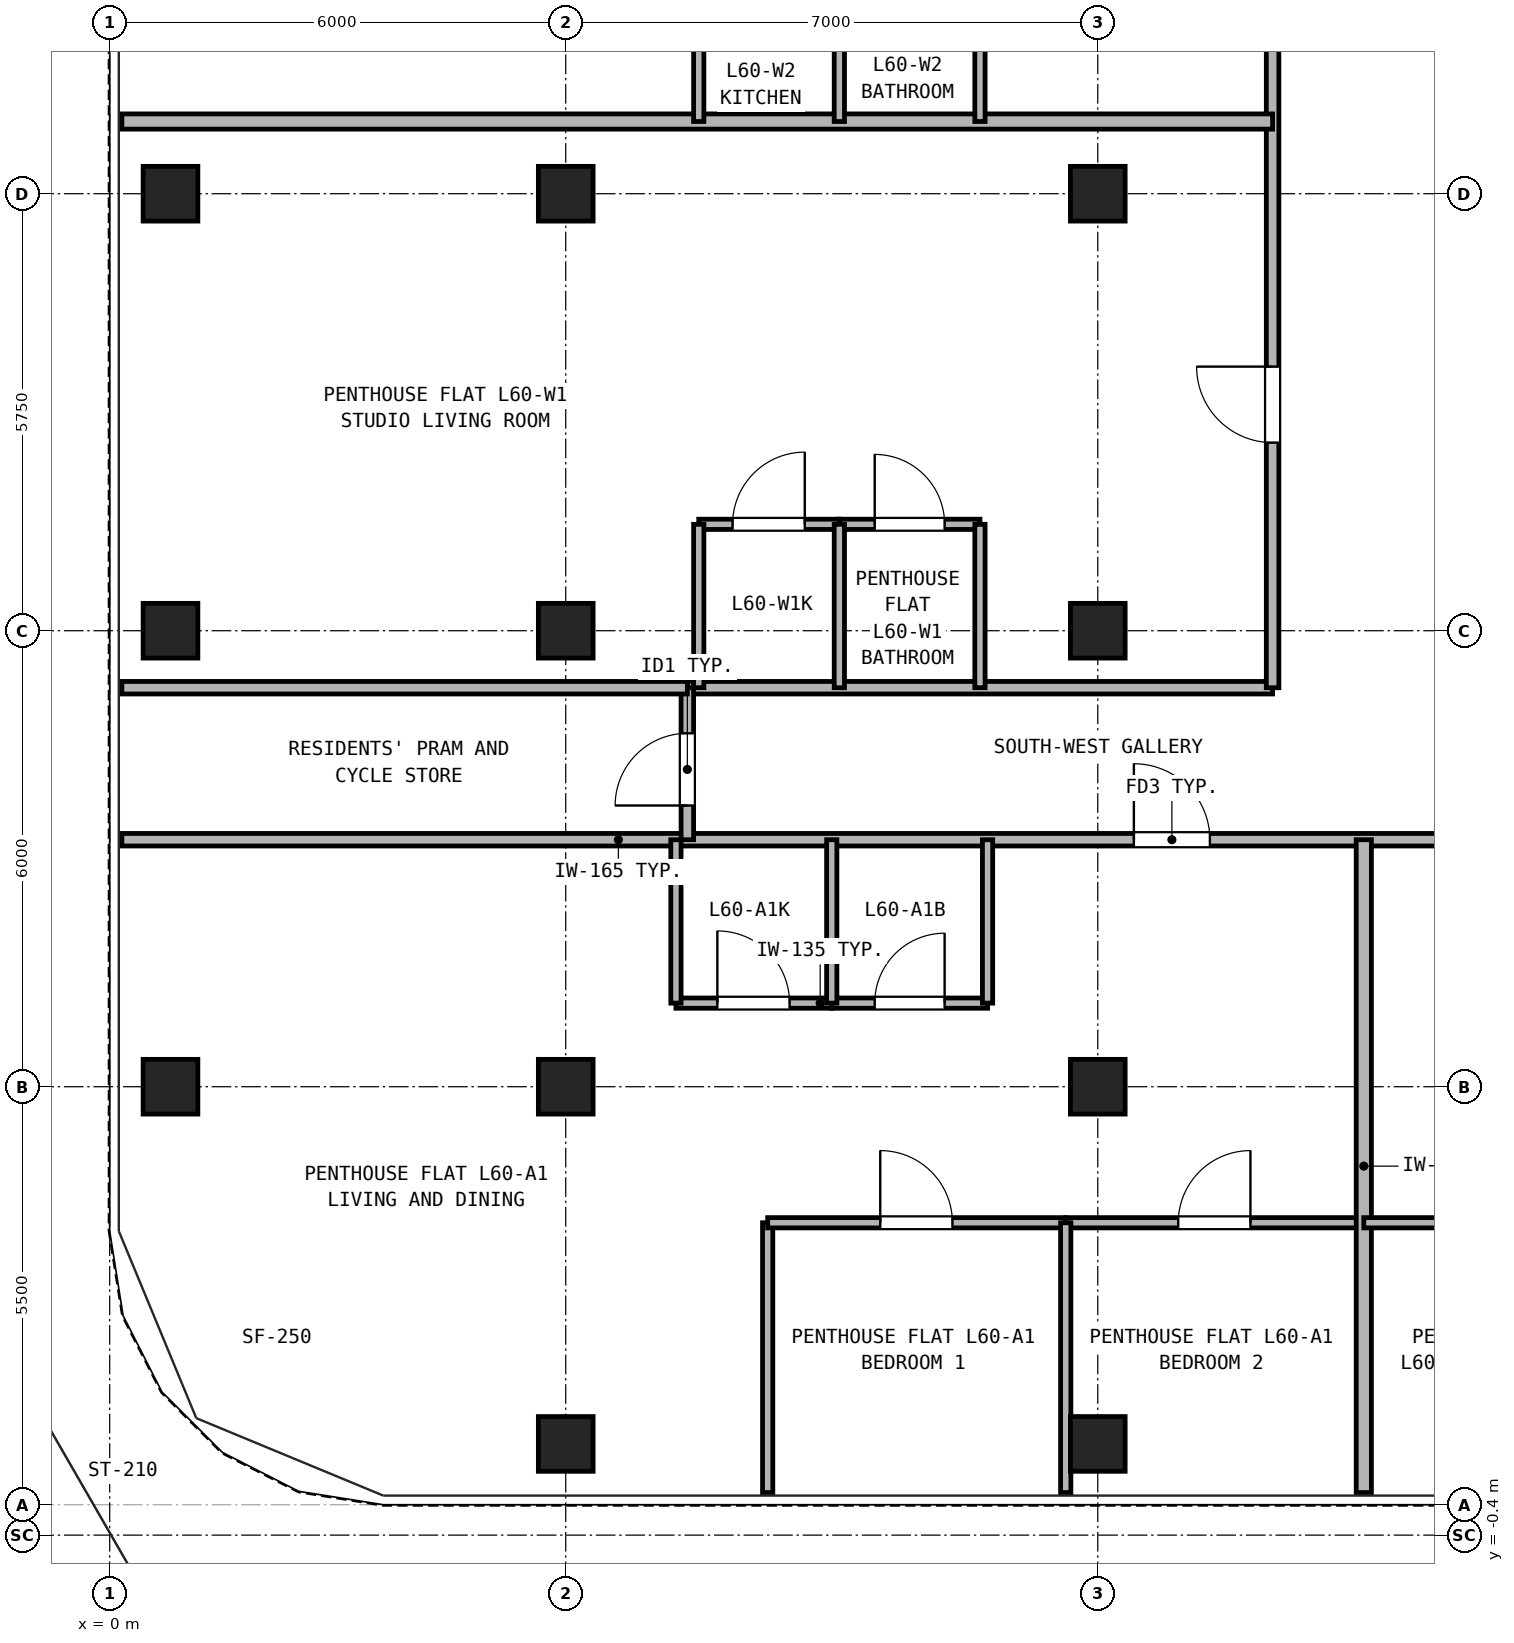
"""IFC4 building model, lengths in metres.
Left out: names, types, materials, properties, quantities, classifications, styles, units other than length and angle.
Written with IfcOpenShell. Run it as: python <this file> out.ifc"""

import sys

from ifc_helpers import new_model, si_unit, direction, frame, frame_2d, origin, origin_2d, place, context, subcontext, project, spatial, rectangle, hollow_rectangle, extrude, source, transform, mapped, element, fill, save


model = new_model("IFC4")
c1 = context("Model", 3, precision=1e-05, world=origin(), true_north=direction((0.0, 1.0)))
c2 = subcontext(c1, "Body", "Model", "MODEL_VIEW")
j1 = project(units=[si_unit("LENGTHUNIT", "METRE"), si_unit("PLANEANGLEUNIT", "RADIAN")], contexts=[c1])
p1 = place(None, origin())
s1 = spatial("IfcSite", under=j1, at=p1, CompositionType="ELEMENT")
p2 = place(p1, origin())
s2 = spatial("IfcBuilding", under=s1, at=p2, CompositionType="ELEMENT")
p3 = place(p2, frame((0.0, 0.0, 212.4)))
s3 = spatial("IfcBuildingStorey", under=s2, at=p3, CompositionType="ELEMENT", Elevation=212.4)
m1 = source(origin(), c2, "Body", "SweptSolid", [
    extrude(hollow_rectangle(XDim=0.72, YDim=0.72, WallThickness=0.04, at=origin_2d()), origin(), (0.0, 0.0, 1.0), 2.84),
])
for number, where, z_axis, x_axis in (
    (1, (6.0, 0.8, 0.0), (0.0, 0.0, 1.0), (1.0, 0.0, 0.0)),
    (2, (13.0, 0.8, 0.0), (0.0, 0.0, 1.0), (1.0, 0.0, 0.0)),
    (3, (0.8, 5.5, 0.0), (0.0, 0.0, 1.0), (1.0, 0.0, 0.0)),
    (4, (0.8, 11.5, 0.0), (0.0, 0.0, 1.0), (1.0, 0.0, 0.0)),
    (5, (0.8, 17.25, 0.0), (0.0, 0.0, 1.0), (1.0, 0.0, 0.0)),
    (6, (6.0, 5.5, 0.0), (0.0, 0.0, 1.0), (1.0, 0.0, 0.0)),
    (7, (6.0, 11.5, 0.0), (0.0, 0.0, 1.0), (1.0, 0.0, 0.0)),
    (8, (6.0, 17.25, 0.0), (0.0, 0.0, 1.0), (1.0, 0.0, 0.0)),
    (9, (13.0, 5.5, 0.0), (0.0, 0.0, 1.0), (1.0, 0.0, 0.0)),
    (10, (13.0, 11.5, 0.0), (0.0, 0.0, 1.0), (1.0, 0.0, 0.0)),
    (11, (13.0, 17.25, 0.0), (0.0, 0.0, 1.0), (1.0, 0.0, 0.0)),
):
    element("IfcColumn", number, at=place(p3, frame(where, z_axis=z_axis, x_axis=x_axis)), inside=s3, PredefinedType="COLUMN", context=c2, shape_type="MappedRepresentation", body=[
        mapped(m1, transform((0.0, 0.0, 0.0), x_axis=(1.0, 0.0, 0.0), y_axis=(0.0, 1.0, 0.0), z_axis=(0.0, 0.0, 1.0), scale=1.0)),
    ])
p4 = place(p3, frame((0.16, 8.75, 0.0), z_axis=(0.0, 0.0, 1.0), x_axis=(1.0, 0.0, 0.0)))
e12 = element("IfcWall", 12, at=p4, inside=s3, PredefinedType="PARTITIONING", context=c2, shape_type="SweptSolid", body=[
    extrude(rectangle(XDim=41.48, YDim=0.165, at=frame_2d((20.74, 0.0))), origin(), (0.0, 0.0, 1.0), 2.84),
])
p5 = place(p4, frame((13.315, 0.0, 0.0)))
e13 = element("IfcOpeningElement", 13, at=p5, cuts=e12, PredefinedType="OPENING", context=c2, shape_type="SweptSolid", body=[
    extrude(rectangle(XDim=1.0, YDim=2.15, at=frame_2d((0.5, 1.075))), frame((0.0, 0.093, 0.0), z_axis=(0.0, -1.0, 0.0), x_axis=(1.0, 0.0, 0.0)), (0.0, 0.0, 1.0), 0.185),
])
p6 = place(p4, frame((19.115, 0.0, 0.0)))
e14 = element("IfcOpeningElement", 14, at=p6, cuts=e12, PredefinedType="OPENING", context=c2, shape_type="SweptSolid", body=[
    extrude(rectangle(XDim=1.0, YDim=2.15, at=frame_2d((0.5, 1.075))), frame((0.0, 0.093, 0.0), z_axis=(0.0, -1.0, 0.0), x_axis=(1.0, 0.0, 0.0)), (0.0, 0.0, 1.0), 0.185),
])
p7 = place(p4, frame((31.865, 0.0, 0.0)))
e15 = element("IfcOpeningElement", 15, at=p7, cuts=e12, PredefinedType="OPENING", context=c2, shape_type="SweptSolid", body=[
    extrude(rectangle(XDim=1.0, YDim=2.15, at=frame_2d((0.5, 1.075))), frame((0.0, 0.093, 0.0), z_axis=(0.0, -1.0, 0.0), x_axis=(1.0, 0.0, 0.0)), (0.0, 0.0, 1.0), 0.185),
])
p8 = place(p3, frame((7.6, 10.75, 0.0), z_axis=(0.0, 0.0, 1.0), x_axis=(1.0, 0.0, 0.0)))
e16 = element("IfcWall", 16, at=p8, inside=s3, PredefinedType="PARTITIONING", context=c2, shape_type="SweptSolid", body=[
    extrude(rectangle(XDim=7.7, YDim=0.165, at=frame_2d((3.85, 0.0))), origin(), (0.0, 0.0, 1.0), 2.84),
])
p9 = place(p3, frame((7.6, 8.75, 0.0), z_axis=(0.0, 0.0, 1.0), x_axis=(0.0, 1.0, 0.0)))
e17 = element("IfcWall", 17, at=p9, inside=s3, PredefinedType="PARTITIONING", context=c2, shape_type="SweptSolid", body=[
    extrude(rectangle(XDim=2.0, YDim=0.165, at=frame_2d((1.0, 0.0))), origin(), (0.0, 0.0, 1.0), 2.84),
])
p10 = place(p9, frame((0.45, 0.0, 0.0)))
e18 = element("IfcOpeningElement", 18, at=p10, cuts=e17, PredefinedType="OPENING", context=c2, shape_type="SweptSolid", body=[
    extrude(rectangle(XDim=0.95, YDim=2.15, at=frame_2d((0.475, 1.075))), frame((0.0, 0.093, 0.0), z_axis=(0.0, -1.0, 0.0), x_axis=(1.0, 0.0, 0.0)), (0.0, 0.0, 1.0), 0.185),
])
p11 = place(p3, frame((15.3, 10.75, 0.0), z_axis=(0.0, 0.0, 1.0), x_axis=(0.0, 1.0, 0.0)))
e19 = element("IfcWall", 19, at=p11, inside=s3, PredefinedType="PARTITIONING", context=c2, shape_type="SweptSolid", body=[
    extrude(rectangle(XDim=24.39, YDim=0.165, at=frame_2d((12.195, 0.0))), origin(), (0.0, 0.0, 1.0), 2.84),
])
p12 = place(p11, frame((3.225, 0.0, 0.0)))
e20 = element("IfcOpeningElement", 20, at=p12, cuts=e19, PredefinedType="OPENING", context=c2, shape_type="SweptSolid", body=[
    extrude(rectangle(XDim=1.0, YDim=2.15, at=frame_2d((0.5, 1.075))), frame((0.0, 0.093, 0.0), z_axis=(0.0, -1.0, 0.0), x_axis=(1.0, 0.0, 0.0)), (0.0, 0.0, 1.0), 0.185),
])
p13 = place(p11, frame((11.15, 0.0, 0.0)))
e21 = element("IfcOpeningElement", 21, at=p13, cuts=e19, PredefinedType="OPENING", context=c2, shape_type="SweptSolid", body=[
    extrude(rectangle(XDim=1.0, YDim=2.15, at=frame_2d((0.5, 1.075))), frame((0.0, 0.093, 0.0), z_axis=(0.0, -1.0, 0.0), x_axis=(1.0, 0.0, 0.0)), (0.0, 0.0, 1.0), 0.185),
])
p14 = place(p11, frame((17.8, 0.0, 0.0)))
e22 = element("IfcOpeningElement", 22, at=p14, cuts=e19, PredefinedType="OPENING", context=c2, shape_type="SweptSolid", body=[
    extrude(rectangle(XDim=1.0, YDim=2.15, at=frame_2d((0.5, 1.075))), frame((0.0, 0.093, 0.0), z_axis=(0.0, -1.0, 0.0), x_axis=(1.0, 0.0, 0.0)), (0.0, 0.0, 1.0), 0.185),
])
p15 = place(p3, frame((7.45, 6.6, 0.0), z_axis=(0.0, 0.0, 1.0), x_axis=(1.0, 0.0, 0.0)))
e23 = element("IfcWall", 23, at=p15, inside=s3, PredefinedType="PARTITIONING", context=c2, shape_type="SweptSolid", body=[
    extrude(rectangle(XDim=2.05, YDim=0.135, at=frame_2d((1.025, 0.0))), origin(), (0.0, 0.0, 1.0), 2.84),
])
p16 = place(p15, frame((0.545, 0.0, 0.0)))
e24 = element("IfcOpeningElement", 24, at=p16, cuts=e23, PredefinedType="OPENING", context=c2, shape_type="SweptSolid", body=[
    extrude(rectangle(XDim=0.95, YDim=2.15, at=frame_2d((0.475, 1.075))), frame((0.0, 0.077, 0.0), z_axis=(0.0, -1.0, 0.0), x_axis=(1.0, 0.0, 0.0)), (0.0, 0.0, 1.0), 0.155),
])
p17 = place(p3, frame((9.5, 6.6, 0.0), z_axis=(0.0, 0.0, 1.0), x_axis=(1.0, 0.0, 0.0)))
e25 = element("IfcWall", 25, at=p17, inside=s3, PredefinedType="PARTITIONING", context=c2, shape_type="SweptSolid", body=[
    extrude(rectangle(XDim=2.05, YDim=0.135, at=frame_2d((1.025, 0.0))), origin(), (0.0, 0.0, 1.0), 2.84),
])
p18 = place(p17, frame((0.565, 0.0, 0.0)))
e26 = element("IfcOpeningElement", 26, at=p18, cuts=e25, PredefinedType="OPENING", context=c2, shape_type="SweptSolid", body=[
    extrude(rectangle(XDim=0.92, YDim=2.1, at=frame_2d((0.46, 1.05))), frame((0.0, 0.077, 0.0), z_axis=(0.0, -1.0, 0.0), x_axis=(1.0, 0.0, 0.0)), (0.0, 0.0, 1.0), 0.155),
])
for number, where, z_axis, x_axis in (
    (27, (7.45, 6.6, 0.0), (0.0, 0.0, 1.0), (0.0, 1.0, 0.0)),
    (28, (9.5, 6.6, 0.0), (0.0, 0.0, 1.0), (0.0, 1.0, 0.0)),
    (29, (11.55, 6.6, 0.0), (0.0, 0.0, 1.0), (0.0, 1.0, 0.0)),
):
    element("IfcWall", number, at=place(p3, frame(where, z_axis=z_axis, x_axis=x_axis)), inside=s3, PredefinedType="PARTITIONING", context=c2, shape_type="SweptSolid", body=[
        extrude(rectangle(XDim=2.15, YDim=0.135, at=frame_2d((1.075, 0.0))), origin(), (0.0, 0.0, 1.0), 2.84),
    ])
p19 = place(p3, frame((8.657, 0.16, 0.0), z_axis=(0.0, 0.0, 1.0), x_axis=(0.0, 1.0, 0.0)))
e30 = element("IfcWall", 30, at=p19, inside=s3, PredefinedType="PARTITIONING", context=c2, shape_type="SweptSolid", body=[
    extrude(rectangle(XDim=3.55, YDim=0.135, at=frame_2d((1.775, 0.0))), origin(), (0.0, 0.0, 1.0), 2.84),
])
p20 = place(p3, frame((8.657, 3.71, 0.0), z_axis=(0.0, 0.0, 1.0), x_axis=(1.0, 0.0, 0.0)))
e31 = element("IfcWall", 31, at=p20, inside=s3, PredefinedType="PARTITIONING", context=c2, shape_type="SweptSolid", body=[
    extrude(rectangle(XDim=3.922, YDim=0.135, at=frame_2d((1.961, 0.0))), origin(), (0.0, 0.0, 1.0), 2.84),
])
p21 = place(p20, frame((1.481, 0.0, 0.0)))
e32 = element("IfcOpeningElement", 32, at=p21, cuts=e31, PredefinedType="OPENING", context=c2, shape_type="SweptSolid", body=[
    extrude(rectangle(XDim=0.95, YDim=2.15, at=frame_2d((0.475, 1.075))), frame((0.0, 0.077, 0.0), z_axis=(0.0, -1.0, 0.0), x_axis=(1.0, 0.0, 0.0)), (0.0, 0.0, 1.0), 0.155),
])
p22 = place(p3, frame((12.579, 3.71, 0.0), z_axis=(0.0, 0.0, 1.0), x_axis=(1.0, 0.0, 0.0)))
e33 = element("IfcWall", 33, at=p22, inside=s3, PredefinedType="PARTITIONING", context=c2, shape_type="SweptSolid", body=[
    extrude(rectangle(XDim=3.921, YDim=0.135, at=frame_2d((1.961, 0.0))), origin(), (0.0, 0.0, 1.0), 2.84),
])
p23 = place(p22, frame((1.48, 0.0, 0.0)))
e34 = element("IfcOpeningElement", 34, at=p23, cuts=e33, PredefinedType="OPENING", context=c2, shape_type="SweptSolid", body=[
    extrude(rectangle(XDim=0.95, YDim=2.15, at=frame_2d((0.475, 1.075))), frame((0.0, 0.077, 0.0), z_axis=(0.0, -1.0, 0.0), x_axis=(1.0, 0.0, 0.0)), (0.0, 0.0, 1.0), 0.155),
])
p24 = place(p3, frame((12.579, 0.16, 0.0), z_axis=(0.0, 0.0, 1.0), x_axis=(0.0, 1.0, 0.0)))
e35 = element("IfcWall", 35, at=p24, inside=s3, PredefinedType="PARTITIONING", context=c2, shape_type="SweptSolid", body=[
    extrude(rectangle(XDim=3.55, YDim=0.135, at=frame_2d((1.775, 0.0))), origin(), (0.0, 0.0, 1.0), 2.84),
])
p25 = place(p3, frame((16.5, 0.16, 0.0), z_axis=(0.0, 0.0, 1.0), x_axis=(0.0, 1.0, 0.0)))
e36 = element("IfcWall", 36, at=p25, inside=s3, PredefinedType="PARTITIONING", context=c2, shape_type="SweptSolid", body=[
    extrude(rectangle(XDim=8.59, YDim=0.2, at=frame_2d((4.295, 0.0))), origin(), (0.0, 0.0, 1.0), 2.84),
])
p26 = place(p3, frame((16.5, 3.71, 0.0), z_axis=(0.0, 0.0, 1.0), x_axis=(1.0, 0.0, 0.0)))
e37 = element("IfcWall", 37, at=p26, inside=s3, PredefinedType="PARTITIONING", context=c2, shape_type="SweptSolid", body=[
    extrude(rectangle(XDim=3.45, YDim=0.135, at=frame_2d((1.725, 0.0))), origin(), (0.0, 0.0, 1.0), 2.84),
])
p27 = place(p26, frame((1.245, 0.0, 0.0)))
e38 = element("IfcOpeningElement", 38, at=p27, cuts=e37, PredefinedType="OPENING", context=c2, shape_type="SweptSolid", body=[
    extrude(rectangle(XDim=0.95, YDim=2.15, at=frame_2d((0.475, 1.075))), frame((0.0, 0.077, 0.0), z_axis=(0.0, -1.0, 0.0), x_axis=(1.0, 0.0, 0.0)), (0.0, 0.0, 1.0), 0.155),
])
p28 = place(p3, frame((0.16, 10.75, 0.0), z_axis=(0.0, 0.0, 1.0), x_axis=(1.0, 0.0, 0.0)))
e39 = element("IfcWall", 39, at=p28, inside=s3, PredefinedType="PARTITIONING", context=c2, shape_type="SweptSolid", body=[
    extrude(rectangle(XDim=7.44, YDim=0.165, at=frame_2d((3.72, 0.0))), origin(), (0.0, 0.0, 1.0), 2.84),
])
p29 = place(p3, frame((7.75, 12.9, 0.0), z_axis=(0.0, 0.0, 1.0), x_axis=(1.0, 0.0, 0.0)))
e40 = element("IfcWall", 40, at=p29, inside=s3, PredefinedType="PARTITIONING", context=c2, shape_type="SweptSolid", body=[
    extrude(rectangle(XDim=1.85, YDim=0.135, at=frame_2d((0.925, 0.0))), origin(), (0.0, 0.0, 1.0), 2.84),
])
p30 = place(p29, frame((0.445, 0.0, 0.0)))
e41 = element("IfcOpeningElement", 41, at=p30, cuts=e40, PredefinedType="OPENING", context=c2, shape_type="SweptSolid", body=[
    extrude(rectangle(XDim=0.95, YDim=2.15, at=frame_2d((0.475, 1.075))), frame((0.0, 0.077, 0.0), z_axis=(0.0, -1.0, 0.0), x_axis=(1.0, 0.0, 0.0)), (0.0, 0.0, 1.0), 0.155),
])
p31 = place(p3, frame((9.6, 12.9, 0.0), z_axis=(0.0, 0.0, 1.0), x_axis=(1.0, 0.0, 0.0)))
e42 = element("IfcWall", 42, at=p31, inside=s3, PredefinedType="PARTITIONING", context=c2, shape_type="SweptSolid", body=[
    extrude(rectangle(XDim=1.85, YDim=0.135, at=frame_2d((0.925, 0.0))), origin(), (0.0, 0.0, 1.0), 2.84),
])
p32 = place(p31, frame((0.465, 0.0, 0.0)))
e43 = element("IfcOpeningElement", 43, at=p32, cuts=e42, PredefinedType="OPENING", context=c2, shape_type="SweptSolid", body=[
    extrude(rectangle(XDim=0.92, YDim=2.1, at=frame_2d((0.46, 1.05))), frame((0.0, 0.077, 0.0), z_axis=(0.0, -1.0, 0.0), x_axis=(1.0, 0.0, 0.0)), (0.0, 0.0, 1.0), 0.155),
])
for number, where, z_axis, x_axis in (
    (44, (7.75, 10.75, 0.0), (0.0, 0.0, 1.0), (0.0, 1.0, 0.0)),
    (45, (9.6, 10.75, 0.0), (0.0, 0.0, 1.0), (0.0, 1.0, 0.0)),
    (46, (11.45, 10.75, 0.0), (0.0, 0.0, 1.0), (0.0, 1.0, 0.0)),
):
    element("IfcWall", number, at=place(p3, frame(where, z_axis=z_axis, x_axis=x_axis)), inside=s3, PredefinedType="PARTITIONING", context=c2, shape_type="SweptSolid", body=[
        extrude(rectangle(XDim=2.15, YDim=0.135, at=frame_2d((1.075, 0.0))), origin(), (0.0, 0.0, 1.0), 2.84),
    ])
p33 = place(p3, frame((0.16, 18.2, 0.0), z_axis=(0.0, 0.0, 1.0), x_axis=(1.0, 0.0, 0.0)))
e47 = element("IfcWall", 47, at=p33, inside=s3, PredefinedType="PARTITIONING", context=c2, shape_type="SweptSolid", body=[
    extrude(rectangle(XDim=15.14, YDim=0.2, at=frame_2d((7.57, 0.0))), origin(), (0.0, 0.0, 1.0), 2.84),
])
for number, where, z_axis, x_axis in (
    (48, (7.75, 18.2, 0.0), (0.0, 0.0, 1.0), (0.0, 1.0, 0.0)),
    (49, (9.6, 18.2, 0.0), (0.0, 0.0, 1.0), (0.0, 1.0, 0.0)),
    (50, (11.45, 18.2, 0.0), (0.0, 0.0, 1.0), (0.0, 1.0, 0.0)),
):
    element("IfcWall", number, at=place(p3, frame(where, z_axis=z_axis, x_axis=x_axis)), inside=s3, PredefinedType="PARTITIONING", context=c2, shape_type="SweptSolid", body=[
        extrude(rectangle(XDim=2.15, YDim=0.135, at=frame_2d((1.075, 0.0))), origin(), (0.0, 0.0, 1.0), 2.84),
    ])
p34 = place(p16, origin())
e51 = element("IfcDoor", 51, at=p34, inside=s3, OperationType="SINGLE_SWING_LEFT", PredefinedType="DOOR", context=c2, shape_type="SweptSolid", body=[
    extrude(rectangle(XDim=0.95, YDim=2.15, at=frame_2d((0.475, 1.075))), frame((0.0, 0.025, 0.0), z_axis=(0.0, -1.0, 0.0), x_axis=(1.0, 0.0, 0.0)), (0.0, 0.0, 1.0), 0.05),
])
fill(e24, e51)
p35 = place(p18, origin())
e52 = element("IfcDoor", 52, at=p35, inside=s3, OperationType="SINGLE_SWING_RIGHT", PredefinedType="DOOR", context=c2, shape_type="SweptSolid", body=[
    extrude(rectangle(XDim=0.92, YDim=2.1, at=frame_2d((0.46, 1.05))), frame((0.0, 0.025, 0.0), z_axis=(0.0, -1.0, 0.0), x_axis=(1.0, 0.0, 0.0)), (0.0, 0.0, 1.0), 0.05),
])
fill(e26, e52)
p36 = place(p21, frame((0.95, 0.0, 0.0), z_axis=(0.0, 0.0, 1.0), x_axis=(-1.0, 0.0, 0.0)))
e53 = element("IfcDoor", 53, at=p36, inside=s3, OperationType="SINGLE_SWING_LEFT", PredefinedType="DOOR", context=c2, shape_type="SweptSolid", body=[
    extrude(rectangle(XDim=0.95, YDim=2.15, at=frame_2d((0.475, 1.075))), frame((0.0, 0.025, 0.0), z_axis=(0.0, -1.0, 0.0), x_axis=(1.0, 0.0, 0.0)), (0.0, 0.0, 1.0), 0.05),
])
fill(e32, e53)
p37 = place(p23, frame((0.95, 0.0, 0.0), z_axis=(0.0, 0.0, 1.0), x_axis=(-1.0, 0.0, 0.0)))
e54 = element("IfcDoor", 54, at=p37, inside=s3, OperationType="SINGLE_SWING_RIGHT", PredefinedType="DOOR", context=c2, shape_type="SweptSolid", body=[
    extrude(rectangle(XDim=0.95, YDim=2.15, at=frame_2d((0.475, 1.075))), frame((0.0, 0.025, 0.0), z_axis=(0.0, -1.0, 0.0), x_axis=(1.0, 0.0, 0.0)), (0.0, 0.0, 1.0), 0.05),
])
fill(e34, e54)
p38 = place(p5, frame((1.0, 0.0, 0.0), z_axis=(0.0, 0.0, 1.0), x_axis=(-1.0, 0.0, 0.0)))
e55 = element("IfcDoor", 55, at=p38, inside=s3, OperationType="SINGLE_SWING_LEFT", PredefinedType="DOOR", context=c2, shape_type="SweptSolid", body=[
    extrude(rectangle(XDim=1.0, YDim=2.15, at=frame_2d((0.5, 1.075))), frame((0.0, 0.025, 0.0), z_axis=(0.0, -1.0, 0.0), x_axis=(1.0, 0.0, 0.0)), (0.0, 0.0, 1.0), 0.05),
])
fill(e13, e55)
p39 = place(p10, frame((0.95, 0.0, 0.0), z_axis=(0.0, 0.0, 1.0), x_axis=(-1.0, 0.0, 0.0)))
e56 = element("IfcDoor", 56, at=p39, inside=s3, OperationType="SINGLE_SWING_LEFT", PredefinedType="DOOR", context=c2, shape_type="SweptSolid", body=[
    extrude(rectangle(XDim=0.95, YDim=2.15, at=frame_2d((0.475, 1.075))), frame((0.0, 0.025, 0.0), z_axis=(0.0, -1.0, 0.0), x_axis=(1.0, 0.0, 0.0)), (0.0, 0.0, 1.0), 0.05),
])
fill(e18, e56)
p40 = place(p30, origin())
e57 = element("IfcDoor", 57, at=p40, inside=s3, OperationType="SINGLE_SWING_RIGHT", PredefinedType="DOOR", context=c2, shape_type="SweptSolid", body=[
    extrude(rectangle(XDim=0.95, YDim=2.15, at=frame_2d((0.475, 1.075))), frame((0.0, 0.025, 0.0), z_axis=(0.0, -1.0, 0.0), x_axis=(1.0, 0.0, 0.0)), (0.0, 0.0, 1.0), 0.05),
])
fill(e41, e57)
p41 = place(p32, origin())
e58 = element("IfcDoor", 58, at=p41, inside=s3, OperationType="SINGLE_SWING_LEFT", PredefinedType="DOOR", context=c2, shape_type="SweptSolid", body=[
    extrude(rectangle(XDim=0.92, YDim=2.1, at=frame_2d((0.46, 1.05))), frame((0.0, 0.025, 0.0), z_axis=(0.0, -1.0, 0.0), x_axis=(1.0, 0.0, 0.0)), (0.0, 0.0, 1.0), 0.05),
])
fill(e43, e58)
p42 = place(p12, origin())
e59 = element("IfcDoor", 59, at=p42, inside=s3, OperationType="SINGLE_SWING_RIGHT", PredefinedType="DOOR", context=c2, shape_type="SweptSolid", body=[
    extrude(rectangle(XDim=1.0, YDim=2.15, at=frame_2d((0.5, 1.075))), frame((0.0, 0.025, 0.0), z_axis=(0.0, -1.0, 0.0), x_axis=(1.0, 0.0, 0.0)), (0.0, 0.0, 1.0), 0.05),
])
fill(e20, e59)
save(model, sys.argv[1])
